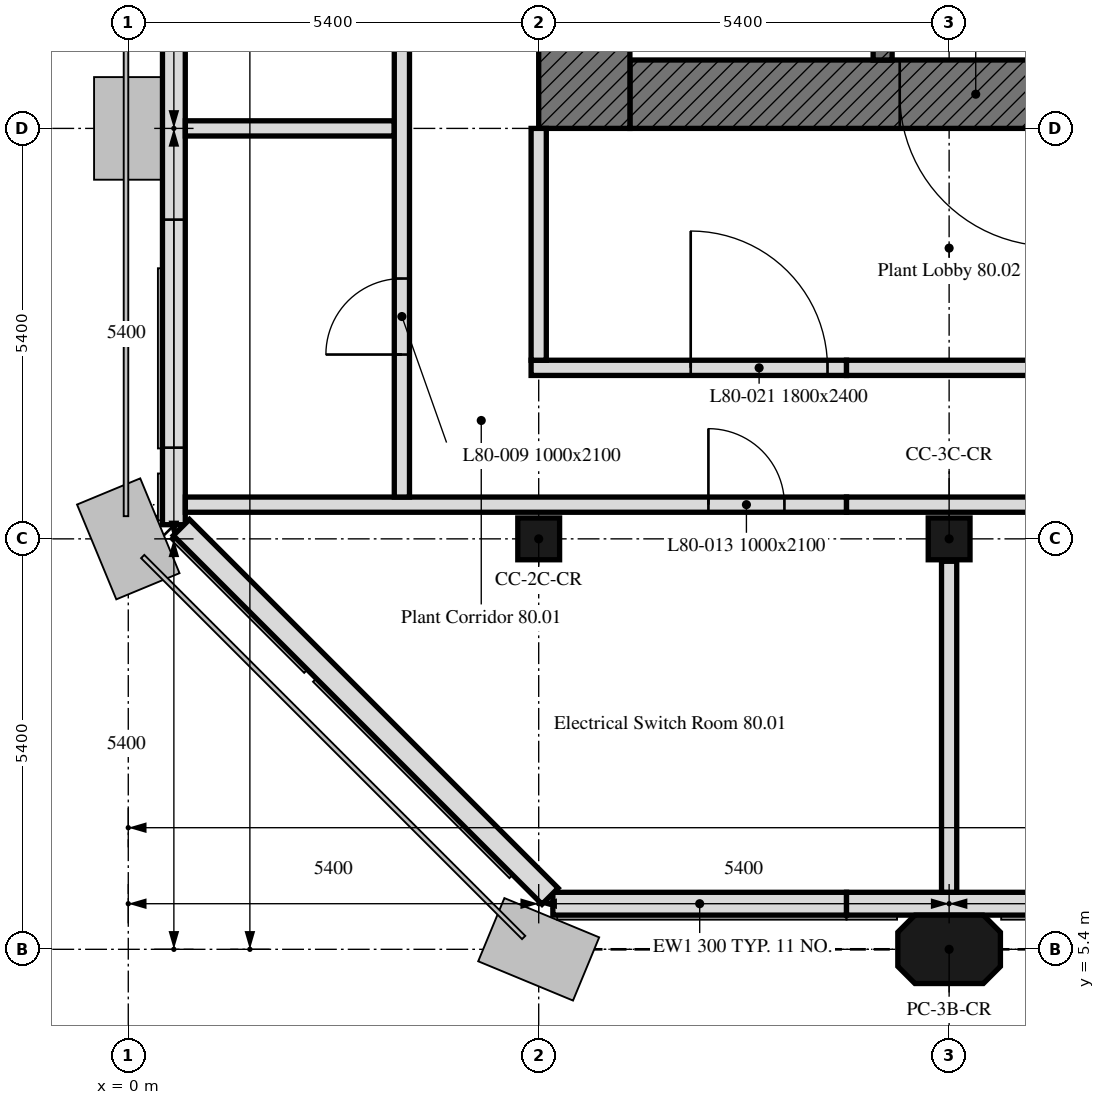
"""IFC4 building model, lengths in metres.
Left out: names, types, materials, properties, quantities, classifications, styles, units other than length and angle.
Written with IfcOpenShell. Run it as: python <this file> out.ifc"""

import sys

from ifc_helpers import new_model, si_unit, direction, frame, frame_2d, origin, origin_2d, place, context, subcontext, project, spatial, polyline, rectangle, outline, extrude, element, fill, save


model = new_model("IFC4")
c1 = context("Model", 3, precision=1e-05, world=origin(), true_north=direction((0.0, 1.0)))
c2 = subcontext(c1, "Body", "Model", "MODEL_VIEW")
j1 = project(units=[si_unit("LENGTHUNIT", "METRE"), si_unit("PLANEANGLEUNIT", "RADIAN")], contexts=[c1])
p1 = place(None, origin())
s1 = spatial("IfcSite", under=j1, at=p1, CompositionType="ELEMENT")
p2 = place(p1, origin())
s2 = spatial("IfcBuilding", under=s1, at=p2, CompositionType="ELEMENT")
p3 = place(p2, frame((0.0, 0.0, 321.7)))
s3 = spatial("IfcBuildingStorey", under=s2, at=p3, CompositionType="ELEMENT", Elevation=321.7)
p4 = place(p3, frame((10.8, 5.4, 0.0), z_axis=(0.0, 0.0, 1.0), x_axis=(1.0, 0.0, 0.0)))
e1 = element("IfcColumn", 1, at=p4, inside=s3, PredefinedType="COLUMN", context=c2, shape_type="SweptSolid", body=[
    extrude(outline(polyline([(-0.45, -0.45), (0.45, -0.45), (0.675, -0.225), (0.675, 0.225), (0.45, 0.45), (-0.45, 0.45), (-0.675, 0.225), (-0.675, -0.225), (-0.45, -0.45)])), origin(), (0.0, 0.0, 1.0), 4.2),
])
for number, where, z_axis, x_axis in (
    (2, (5.4, 10.8, 0.0), (0.0, 0.0, 1.0), (1.0, 0.0, 0.0)),
    (3, (10.8, 10.8, 0.0), (0.0, 0.0, 1.0), (1.0, 0.0, 0.0)),
):
    element("IfcColumn", number, at=place(p3, frame(where, z_axis=z_axis, x_axis=x_axis)), inside=s3, PredefinedType="COLUMN", context=c2, shape_type="SweptSolid", body=[
        extrude(rectangle(XDim=0.55, YDim=0.55, at=origin_2d()), origin(), (0.0, 0.0, 1.0), 4.2),
    ])
p5 = place(p3, frame((5.586, 6.0, 0.0), z_axis=(0.0, 0.0, 1.0), x_axis=(1.0, 0.0, 0.0)))
e4 = element("IfcWall", 4, at=p5, inside=s3, PredefinedType="SOLIDWALL", context=c2, shape_type="SweptSolid", body=[
    extrude(outline(polyline([(0.0, 0.0), (3.864, 0.0), (3.864, 4.2), (3.312, 6.955), (2.76, 6.709), (2.208, 6.464), (1.656, 6.219), (1.104, 5.973), (0.552, 5.728), (0.0, 5.483), (0.0, 0.0)])), frame((0.0, 0.15, 0.0), z_axis=(0.0, -1.0, 0.0), x_axis=(1.0, 0.0, 0.0)), (0.0, 0.0, 1.0), 0.3),
])
p6 = place(p3, frame((9.45, 6.0, 0.0), z_axis=(0.0, 0.0, 1.0), x_axis=(1.0, 0.0, 0.0)))
e5 = element("IfcWall", 5, at=p6, inside=s3, PredefinedType="SOLIDWALL", context=c2, shape_type="SweptSolid", body=[
    extrude(outline(polyline([(0.0, 0.0), (28.164, 0.0), (28.164, 4.2), (27.564, 4.2), (26.965, 4.2), (26.366, 4.2), (25.767, 4.2), (25.167, 4.2), (24.568, 4.2), (23.969, 4.2), (23.37, 4.2), (22.771, 4.2), (22.171, 4.2), (21.572, 4.2), (20.973, 4.2), (20.374, 4.2), (19.774, 4.2), (19.175, 4.2), (18.576, 4.2), (17.977, 4.2), (17.377, 4.2), (16.778, 4.2), (16.179, 4.2), (15.58, 4.2), (14.981, 4.2), (14.381, 4.2), (13.782, 4.2), (13.183, 4.2), (12.584, 4.2), (11.985, 4.2), (11.385, 4.2), (10.786, 4.2), (10.187, 4.2), (9.588, 4.2), (8.988, 4.2), (8.389, 4.2), (7.79, 4.2), (7.191, 4.2), (6.592, 4.2), (5.992, 4.2), (5.393, 4.2), (4.794, 4.2), (4.195, 4.2), (3.595, 4.2), (2.996, 4.2), (2.397, 4.2), (1.798, 4.2), (1.198, 4.2), (0.599, 4.2), (0.0, 4.2), (0.0, 0.0)])), frame((0.0, 0.15, 0.0), z_axis=(0.0, -1.0, 0.0), x_axis=(1.0, 0.0, 0.0)), (0.0, 0.0, 1.0), 0.3),
])
p7 = place(p6, frame((2.55, 0.0, 0.6)))
e6 = element("IfcOpeningElement", 6, at=p7, cuts=e5, PredefinedType="OPENING", context=c2, shape_type="SweptSolid", body=[
    extrude(rectangle(XDim=3.0, YDim=1.8, at=frame_2d((1.5, 0.9))), frame((0.0, 0.16, 0.0), z_axis=(0.0, -1.0, 0.0), x_axis=(1.0, 0.0, 0.0)), (0.0, 0.0, 1.0), 0.32),
])
p8 = place(p6, frame((7.95, 0.0, 0.6)))
e7 = element("IfcOpeningElement", 7, at=p8, cuts=e5, PredefinedType="OPENING", context=c2, shape_type="SweptSolid", body=[
    extrude(rectangle(XDim=3.0, YDim=1.8, at=frame_2d((1.5, 0.9))), frame((0.0, 0.16, 0.0), z_axis=(0.0, -1.0, 0.0), x_axis=(1.0, 0.0, 0.0)), (0.0, 0.0, 1.0), 0.32),
])
p9 = place(p6, frame((13.35, 0.0, 0.6)))
e8 = element("IfcOpeningElement", 8, at=p9, cuts=e5, PredefinedType="OPENING", context=c2, shape_type="SweptSolid", body=[
    extrude(rectangle(XDim=3.0, YDim=1.8, at=frame_2d((1.5, 0.9))), frame((0.0, 0.16, 0.0), z_axis=(0.0, -1.0, 0.0), x_axis=(1.0, 0.0, 0.0)), (0.0, 0.0, 1.0), 0.32),
])
p10 = place(p6, frame((18.75, 0.0, 0.6)))
e9 = element("IfcOpeningElement", 9, at=p10, cuts=e5, PredefinedType="OPENING", context=c2, shape_type="SweptSolid", body=[
    extrude(rectangle(XDim=3.0, YDim=1.8, at=frame_2d((1.5, 0.9))), frame((0.0, 0.16, 0.0), z_axis=(0.0, -1.0, 0.0), x_axis=(1.0, 0.0, 0.0)), (0.0, 0.0, 1.0), 0.32),
])
p11 = place(p6, frame((24.15, 0.0, 0.6)))
e10 = element("IfcOpeningElement", 10, at=p11, cuts=e5, PredefinedType="OPENING", context=c2, shape_type="SweptSolid", body=[
    extrude(rectangle(XDim=3.0, YDim=1.8, at=frame_2d((1.5, 0.9))), frame((0.0, 0.16, 0.0), z_axis=(0.0, -1.0, 0.0), x_axis=(1.0, 0.0, 0.0)), (0.0, 0.0, 1.0), 0.32),
])
p12 = place(p3, frame((0.6, 43.014, 0.0), z_axis=(0.0, 0.0, 1.0), x_axis=(0.0, -1.0, 0.0)))
e11 = element("IfcWall", 11, at=p12, inside=s3, PredefinedType="SOLIDWALL", context=c2, shape_type="SweptSolid", body=[
    extrude(outline(polyline([(0.0, 0.0), (32.027, 0.0), (32.027, 3.267), (31.434, 3.267), (30.841, 3.267), (30.248, 3.267), (29.655, 3.267), (29.062, 3.267), (28.469, 3.267), (27.875, 3.267), (27.282, 3.267), (26.689, 3.267), (26.096, 3.267), (25.503, 3.267), (24.91, 3.267), (24.317, 3.267), (23.724, 3.267), (23.131, 3.267), (22.538, 3.267), (21.945, 3.267), (21.352, 3.267), (20.758, 3.267), (20.165, 3.267), (19.572, 3.267), (18.979, 3.267), (18.386, 3.267), (17.793, 3.267), (17.2, 3.267), (16.607, 3.267), (16.014, 3.267), (15.42, 3.267), (14.827, 3.267), (14.234, 3.267), (13.641, 3.267), (13.048, 3.267), (12.455, 3.267), (11.862, 3.267), (11.269, 3.267), (10.676, 3.267), (10.083, 3.267), (9.49, 3.267), (8.896, 3.267), (8.303, 3.267), (7.71, 3.267), (7.117, 3.267), (6.524, 3.267), (5.931, 3.267), (5.338, 3.267), (4.745, 3.267), (4.152, 3.267), (3.559, 3.267), (2.966, 3.267), (2.372, 3.267), (1.779, 3.267), (1.186, 3.267), (0.593, 3.267), (0.0, 3.267), (0.0, 0.0)])), frame((0.0, 0.15, 0.0), z_axis=(0.0, -1.0, 0.0), x_axis=(1.0, 0.0, 0.0)), (0.0, 0.0, 1.0), 0.3),
])
p13 = place(p12, frame((1.81, 0.0, 0.6)))
e12 = element("IfcOpeningElement", 12, at=p13, cuts=e11, PredefinedType="OPENING", context=c2, shape_type="SweptSolid", body=[
    extrude(rectangle(XDim=3.0, YDim=1.8, at=frame_2d((1.5, 0.9))), frame((0.0, 0.16, 0.0), z_axis=(0.0, -1.0, 0.0), x_axis=(1.0, 0.0, 0.0)), (0.0, 0.0, 1.0), 0.32),
])
p14 = place(p12, frame((6.414, 0.0, 0.6)))
e13 = element("IfcOpeningElement", 13, at=p14, cuts=e11, PredefinedType="OPENING", context=c2, shape_type="SweptSolid", body=[
    extrude(rectangle(XDim=3.0, YDim=1.8, at=frame_2d((1.5, 0.9))), frame((0.0, 0.16, 0.0), z_axis=(0.0, -1.0, 0.0), x_axis=(1.0, 0.0, 0.0)), (0.0, 0.0, 1.0), 0.32),
])
p15 = place(p12, frame((11.814, 0.0, 0.6)))
e14 = element("IfcOpeningElement", 14, at=p15, cuts=e11, PredefinedType="OPENING", context=c2, shape_type="SweptSolid", body=[
    extrude(rectangle(XDim=3.0, YDim=1.8, at=frame_2d((1.5, 0.9))), frame((0.0, 0.16, 0.0), z_axis=(0.0, -1.0, 0.0), x_axis=(1.0, 0.0, 0.0)), (0.0, 0.0, 1.0), 0.32),
])
p16 = place(p12, frame((17.214, 0.0, 0.6)))
e15 = element("IfcOpeningElement", 15, at=p16, cuts=e11, PredefinedType="OPENING", context=c2, shape_type="SweptSolid", body=[
    extrude(rectangle(XDim=3.0, YDim=1.8, at=frame_2d((1.5, 0.9))), frame((0.0, 0.16, 0.0), z_axis=(0.0, -1.0, 0.0), x_axis=(1.0, 0.0, 0.0)), (0.0, 0.0, 1.0), 0.32),
])
p17 = place(p12, frame((22.614, 0.0, 0.6)))
e16 = element("IfcOpeningElement", 16, at=p17, cuts=e11, PredefinedType="OPENING", context=c2, shape_type="SweptSolid", body=[
    extrude(rectangle(XDim=3.0, YDim=1.8, at=frame_2d((1.5, 0.9))), frame((0.0, 0.16, 0.0), z_axis=(0.0, -1.0, 0.0), x_axis=(1.0, 0.0, 0.0)), (0.0, 0.0, 1.0), 0.32),
])
p18 = place(p12, frame((28.014, 0.0, 0.6)))
e17 = element("IfcOpeningElement", 17, at=p18, cuts=e11, PredefinedType="OPENING", context=c2, shape_type="SweptSolid", body=[
    extrude(rectangle(XDim=3.0, YDim=1.8, at=frame_2d((1.5, 0.9))), frame((0.0, 0.16, 0.0), z_axis=(0.0, -1.0, 0.0), x_axis=(1.0, 0.0, 0.0)), (0.0, 0.0, 1.0), 0.32),
])
p19 = place(p3, frame((0.699, 10.949, 0.0), z_axis=(0.0, 0.0, 1.0), x_axis=(0.707106781187, -0.707106781187, 0.0)))
e18 = element("IfcWall", 18, at=p19, inside=s3, PredefinedType="SOLIDWALL", context=c2, shape_type="SweptSolid", body=[
    extrude(outline(polyline([(0.0, 0.0), (6.86, 0.0), (6.86, 5.467), (6.288, 5.287), (5.716, 5.107), (5.145, 4.927), (4.573, 4.748), (4.001, 4.568), (3.43, 4.389), (2.858, 4.209), (2.287, 4.029), (1.715, 3.85), (1.143, 3.67), (0.572, 3.49), (0.0, 3.311), (0.0, 0.0)])), frame((0.0, 0.15, 0.0), z_axis=(0.0, -1.0, 0.0), x_axis=(1.0, 0.0, 0.0)), (0.0, 0.0, 1.0), 0.3),
])
p20 = place(p3, frame((17.7, 16.65, 0.0), z_axis=(0.0, 0.0, 1.0), x_axis=(-1.0, 0.0, 0.0)))
e19 = element("IfcWall", 19, at=p20, inside=s3, PredefinedType="SOLIDWALL", context=c2, shape_type="SweptSolid", body=[
    extrude(outline(polyline([(0.0, 0.0), (11.1, 0.0), (11.1, 5.933), (0.0, 4.2), (0.0, 0.0)])), frame((0.0, 0.45, 0.0), z_axis=(0.0, -1.0, 0.0), x_axis=(1.0, 0.0, 0.0)), (0.0, 0.0, 1.0), 0.9),
])
p21 = place(p20, frame((5.55, 0.0, 0.0)))
e20 = element("IfcOpeningElement", 20, at=p21, cuts=e19, PredefinedType="OPENING", context=c2, shape_type="SweptSolid", body=[
    extrude(rectangle(XDim=2.0, YDim=2.4, at=frame_2d((1.0, 1.2))), frame((0.0, 0.45, 0.0), z_axis=(0.0, -1.0, 0.0), x_axis=(1.0, 0.0, 0.0)), (0.0, 0.0, 1.0), 0.9),
])
p22 = place(p3, frame((6.0, 16.2, 0.0), z_axis=(0.0, 0.0, 1.0), x_axis=(0.0, 1.0, 0.0)))
e21 = element("IfcWall", 21, at=p22, inside=s3, PredefinedType="SOLIDWALL", context=c2, shape_type="SweptSolid", body=[
    extrude(rectangle(XDim=16.2, YDim=1.2, at=frame_2d((8.1, 0.0))), origin(), (0.0, 0.0, 1.0), 5.667),
])
p23 = place(p3, frame((9.925, 17.1, 0.0), z_axis=(0.0, 0.0, 1.0), x_axis=(0.0, 1.0, 0.0)))
e22 = element("IfcWall", 22, at=p23, inside=s3, PredefinedType="SOLIDWALL", context=c2, shape_type="SweptSolid", body=[
    extrude(rectangle(XDim=14.4, YDim=0.25, at=frame_2d((7.2, 0.0))), origin(), (0.0, 0.0, 1.0), 4.2),
])
p24 = place(p23, frame((4.6, 0.0, 0.0)))
e23 = element("IfcOpeningElement", 23, at=p24, cuts=e22, PredefinedType="OPENING", context=c2, shape_type="SweptSolid", body=[
    extrude(rectangle(XDim=1.0, YDim=2.1, at=frame_2d((0.5, 1.05))), frame((0.0, 0.125, 0.0), z_axis=(0.0, -1.0, 0.0), x_axis=(1.0, 0.0, 0.0)), (0.0, 0.0, 1.0), 0.25),
])
p25 = place(p23, frame((7.062, 0.0, 0.0)))
e24 = element("IfcOpeningElement", 24, at=p25, cuts=e22, PredefinedType="OPENING", context=c2, shape_type="SweptSolid", body=[
    extrude(rectangle(XDim=1.2, YDim=2.1, at=frame_2d((0.6, 1.05))), frame((0.0, 0.125, 0.0), z_axis=(0.0, -1.0, 0.0), x_axis=(1.0, 0.0, 0.0)), (0.0, 0.0, 1.0), 0.25),
])
p26 = place(p23, frame((10.106, 0.0, 0.0)))
e25 = element("IfcOpeningElement", 25, at=p26, cuts=e22, PredefinedType="OPENING", context=c2, shape_type="SweptSolid", body=[
    extrude(rectangle(XDim=0.9, YDim=2.1, at=frame_2d((0.45, 1.05))), frame((0.0, 0.125, 0.0), z_axis=(0.0, -1.0, 0.0), x_axis=(1.0, 0.0, 0.0)), (0.0, 0.0, 1.0), 0.25),
])
p27 = place(p23, frame((12.719, 0.0, 0.0)))
e26 = element("IfcOpeningElement", 26, at=p27, cuts=e22, PredefinedType="OPENING", context=c2, shape_type="SweptSolid", body=[
    extrude(rectangle(XDim=0.9, YDim=2.1, at=frame_2d((0.45, 1.05))), frame((0.0, 0.125, 0.0), z_axis=(0.0, -1.0, 0.0), x_axis=(1.0, 0.0, 0.0)), (0.0, 0.0, 1.0), 0.25),
])
p28 = place(p3, frame((3.5, 16.2, 0.0), z_axis=(0.0, 0.0, 1.0), x_axis=(-1.0, 0.0, 0.0)))
e27 = element("IfcWall", 27, at=p28, inside=s3, PredefinedType="PARTITIONING", context=c2, shape_type="SweptSolid", body=[
    extrude(outline(polyline([(0.0, 0.0), (2.749, 0.0), (2.749, 3.334), (0.0, 4.556), (0.0, 0.0)])), frame((0.0, 0.1, 0.0), z_axis=(0.0, -1.0, 0.0), x_axis=(1.0, 0.0, 0.0)), (0.0, 0.0, 1.0), 0.2),
])
p29 = place(p3, frame((10.8, 10.505, 0.0), z_axis=(0.0, 0.0, 1.0), x_axis=(0.0, -1.0, 0.0)))
e28 = element("IfcWall", 28, at=p29, inside=s3, PredefinedType="PARTITIONING", context=c2, shape_type="SweptSolid", body=[
    extrude(rectangle(XDim=4.354, YDim=0.2, at=frame_2d((2.177, 0.0))), origin(), (0.0, 0.0, 1.0), 4.2),
])
p30 = place(p3, frame((0.751, 11.25, 0.0), z_axis=(0.0, 0.0, 1.0), x_axis=(1.0, 0.0, 0.0)))
e29 = element("IfcWall", 29, at=p30, inside=s3, PredefinedType="PARTITIONING", context=c2, shape_type="SweptSolid", body=[
    extrude(outline(polyline([(0.0, 0.0), (8.699, 0.0), (8.699, 4.2), (0.0, 3.334), (0.0, 0.0)])), frame((0.0, 0.1, 0.0), z_axis=(0.0, -1.0, 0.0), x_axis=(1.0, 0.0, 0.0)), (0.0, 0.0, 1.0), 0.2),
])
p31 = place(p30, frame((6.882, 0.0, 0.0)))
e30 = element("IfcOpeningElement", 30, at=p31, cuts=e29, PredefinedType="OPENING", context=c2, shape_type="SweptSolid", body=[
    extrude(rectangle(XDim=1.0, YDim=2.1, at=frame_2d((0.5, 1.05))), frame((0.0, 0.1, 0.0), z_axis=(0.0, -1.0, 0.0), x_axis=(1.0, 0.0, 0.0)), (0.0, 0.0, 1.0), 0.2),
])
p32 = place(p3, frame((9.45, 11.25, 0.0), z_axis=(0.0, 0.0, 1.0), x_axis=(1.0, 0.0, 0.0)))
e31 = element("IfcWall", 31, at=p32, inside=s3, PredefinedType="PARTITIONING", context=c2, shape_type="SweptSolid", body=[
    extrude(rectangle(XDim=32.999, YDim=0.2, at=frame_2d((16.5, 0.0))), origin(), (0.0, 0.0, 1.0), 4.2),
])
p33 = place(p32, frame((25.167, 0.0, 0.0)))
e32 = element("IfcOpeningElement", 32, at=p33, cuts=e31, PredefinedType="OPENING", context=c2, shape_type="SweptSolid", body=[
    extrude(rectangle(XDim=1.0, YDim=2.1, at=frame_2d((0.5, 1.05))), frame((0.0, 0.1, 0.0), z_axis=(0.0, -1.0, 0.0), x_axis=(1.0, 0.0, 0.0)), (0.0, 0.0, 1.0), 0.2),
])
p34 = place(p32, frame((19.733, 0.0, 0.0)))
e33 = element("IfcOpeningElement", 33, at=p34, cuts=e31, PredefinedType="OPENING", context=c2, shape_type="SweptSolid", body=[
    extrude(rectangle(XDim=1.0, YDim=2.1, at=frame_2d((0.5, 1.05))), frame((0.0, 0.1, 0.0), z_axis=(0.0, -1.0, 0.0), x_axis=(1.0, 0.0, 0.0)), (0.0, 0.0, 1.0), 0.2),
])
p35 = place(p32, frame((3.567, 0.0, 0.0)))
e34 = element("IfcOpeningElement", 34, at=p35, cuts=e31, PredefinedType="OPENING", context=c2, shape_type="SweptSolid", body=[
    extrude(rectangle(XDim=1.0, YDim=2.1, at=frame_2d((0.5, 1.05))), frame((0.0, 0.1, 0.0), z_axis=(0.0, -1.0, 0.0), x_axis=(1.0, 0.0, 0.0)), (0.0, 0.0, 1.0), 0.2),
])
p36 = place(p3, frame((3.6, 11.35, 0.0), z_axis=(0.0, 0.0, 1.0), x_axis=(0.0, 1.0, 0.0)))
e35 = element("IfcWall", 35, at=p36, inside=s3, PredefinedType="PARTITIONING", context=c2, shape_type="SweptSolid", body=[
    extrude(rectangle(XDim=29.95, YDim=0.2, at=frame_2d((14.975, 0.0))), origin(), (0.0, 0.0, 1.0), 4.6),
])
p37 = place(p36, frame((23.508, 0.0, 0.0)))
e36 = element("IfcOpeningElement", 36, at=p37, cuts=e35, PredefinedType="OPENING", context=c2, shape_type="SweptSolid", body=[
    extrude(rectangle(XDim=1.0, YDim=2.1, at=frame_2d((0.5, 1.05))), frame((0.0, 0.1, 0.0), z_axis=(0.0, -1.0, 0.0), x_axis=(1.0, 0.0, 0.0)), (0.0, 0.0, 1.0), 0.2),
])
p38 = place(p36, frame((17.85, 0.0, 0.0)))
e37 = element("IfcOpeningElement", 37, at=p38, cuts=e35, PredefinedType="OPENING", context=c2, shape_type="SweptSolid", body=[
    extrude(rectangle(XDim=1.0, YDim=2.1, at=frame_2d((0.5, 1.05))), frame((0.0, 0.1, 0.0), z_axis=(0.0, -1.0, 0.0), x_axis=(1.0, 0.0, 0.0)), (0.0, 0.0, 1.0), 0.2),
])
p39 = place(p36, frame((1.875, 0.0, 0.0)))
e38 = element("IfcOpeningElement", 38, at=p39, cuts=e35, PredefinedType="OPENING", context=c2, shape_type="SweptSolid", body=[
    extrude(rectangle(XDim=1.0, YDim=2.1, at=frame_2d((0.5, 1.05))), frame((0.0, 0.1, 0.0), z_axis=(0.0, -1.0, 0.0), x_axis=(1.0, 0.0, 0.0)), (0.0, 0.0, 1.0), 0.2),
])
p40 = place(p36, frame((9.75, 0.0, 0.0)))
e39 = element("IfcOpeningElement", 39, at=p40, cuts=e35, PredefinedType="OPENING", context=c2, shape_type="SweptSolid", body=[
    extrude(rectangle(XDim=1.0, YDim=2.1, at=frame_2d((0.5, 1.05))), frame((0.0, 0.1, 0.0), z_axis=(0.0, -1.0, 0.0), x_axis=(1.0, 0.0, 0.0)), (0.0, 0.0, 1.0), 0.2),
])
p41 = place(p3, frame((5.3, 13.05, 0.0), z_axis=(0.0, 0.0, 1.0), x_axis=(1.0, 0.0, 0.0)))
e40 = element("IfcWall", 40, at=p41, inside=s3, PredefinedType="PARTITIONING", context=c2, shape_type="SweptSolid", body=[
    extrude(outline(polyline([(0.0, 0.0), (4.15, 0.0), (4.15, 4.2), (0.0, 5.356), (0.0, 0.0)])), frame((0.0, 0.1, 0.0), z_axis=(0.0, -1.0, 0.0), x_axis=(1.0, 0.0, 0.0)), (0.0, 0.0, 1.0), 0.2),
])
p42 = place(p41, frame((2.1, 0.0, 0.0)))
e41 = element("IfcOpeningElement", 41, at=p42, cuts=e40, PredefinedType="OPENING", context=c2, shape_type="SweptSolid", body=[
    extrude(rectangle(XDim=1.8, YDim=2.4, at=frame_2d((0.9, 1.2))), frame((0.0, 0.1, 0.0), z_axis=(0.0, -1.0, 0.0), x_axis=(1.0, 0.0, 0.0)), (0.0, 0.0, 1.0), 0.2),
])
p43 = place(p3, frame((9.45, 13.05, 0.0), z_axis=(0.0, 0.0, 1.0), x_axis=(1.0, 0.0, 0.0)))
e42 = element("IfcWall", 42, at=p43, inside=s3, PredefinedType="PARTITIONING", context=c2, shape_type="SweptSolid", body=[
    extrude(rectangle(XDim=31.899, YDim=0.2, at=frame_2d((15.95, 0.0))), origin(), (0.0, 0.0, 1.0), 4.2),
])
p44 = place(p43, frame((19.75, 0.0, 0.0)))
e43 = element("IfcOpeningElement", 43, at=p44, cuts=e42, PredefinedType="OPENING", context=c2, shape_type="SweptSolid", body=[
    extrude(rectangle(XDim=1.0, YDim=2.1, at=frame_2d((0.5, 1.05))), frame((0.0, 0.1, 0.0), z_axis=(0.0, -1.0, 0.0), x_axis=(1.0, 0.0, 0.0)), (0.0, 0.0, 1.0), 0.2),
])
p45 = place(p43, frame((14.35, 0.0, 0.0)))
e44 = element("IfcOpeningElement", 44, at=p45, cuts=e42, PredefinedType="OPENING", context=c2, shape_type="SweptSolid", body=[
    extrude(rectangle(XDim=1.0, YDim=2.1, at=frame_2d((0.5, 1.05))), frame((0.0, 0.1, 0.0), z_axis=(0.0, -1.0, 0.0), x_axis=(1.0, 0.0, 0.0)), (0.0, 0.0, 1.0), 0.2),
])
p46 = place(p43, frame((9.05, 0.0, 0.0)))
e45 = element("IfcOpeningElement", 45, at=p46, cuts=e42, PredefinedType="OPENING", context=c2, shape_type="SweptSolid", body=[
    extrude(rectangle(XDim=0.8, YDim=2.1, at=frame_2d((0.4, 1.05))), frame((0.0, 0.1, 0.0), z_axis=(0.0, -1.0, 0.0), x_axis=(1.0, 0.0, 0.0)), (0.0, 0.0, 1.0), 0.2),
])
p47 = place(p43, frame((25.35, 0.0, 0.0)))
e46 = element("IfcOpeningElement", 46, at=p47, cuts=e42, PredefinedType="OPENING", context=c2, shape_type="SweptSolid", body=[
    extrude(rectangle(XDim=1.8, YDim=2.4, at=frame_2d((0.9, 1.2))), frame((0.0, 0.1, 0.0), z_axis=(0.0, -1.0, 0.0), x_axis=(1.0, 0.0, 0.0)), (0.0, 0.0, 1.0), 0.2),
])
p48 = place(p3, frame((5.4, 16.2, 0.0), z_axis=(0.0, 0.0, 1.0), x_axis=(0.0, -1.0, 0.0)))
e47 = element("IfcWall", 47, at=p48, inside=s3, PredefinedType="PARTITIONING", context=c2, shape_type="SweptSolid", body=[
    extrude(rectangle(XDim=3.05, YDim=0.2, at=frame_2d((1.525, 0.0))), origin(), (0.0, 0.0, 1.0), 5.4),
])
p49 = place(p18, origin())
e48 = element("IfcWindow", 48, at=p49, inside=s3, PartitioningType="SINGLE_PANEL", PredefinedType="WINDOW", context=c2, shape_type="SweptSolid", body=[
    extrude(rectangle(XDim=3.0, YDim=1.8, at=frame_2d((1.5, 0.9))), frame((0.0, 0.03, 0.0), z_axis=(0.0, -1.0, 0.0), x_axis=(1.0, 0.0, 0.0)), (0.0, 0.0, 1.0), 0.06),
])
fill(e17, e48)
p50 = place(p21, origin())
e49 = element("IfcDoor", 49, at=p50, inside=s3, OperationType="DOUBLE_DOOR_SINGLE_SWING", PredefinedType="DOOR", context=c2, shape_type="SweptSolid", body=[
    extrude(rectangle(XDim=2.0, YDim=2.4, at=frame_2d((1.0, 1.2))), frame((0.0, 0.025, 0.0), z_axis=(0.0, -1.0, 0.0), x_axis=(1.0, 0.0, 0.0)), (0.0, 0.0, 1.0), 0.05),
])
fill(e20, e49)
p51 = place(p39, origin())
e50 = element("IfcDoor", 50, at=p51, inside=s3, OperationType="SINGLE_SWING_RIGHT", PredefinedType="DOOR", context=c2, shape_type="SweptSolid", body=[
    extrude(rectangle(XDim=1.0, YDim=2.1, at=frame_2d((0.5, 1.05))), frame((0.0, 0.025, 0.0), z_axis=(0.0, -1.0, 0.0), x_axis=(1.0, 0.0, 0.0)), (0.0, 0.0, 1.0), 0.05),
])
fill(e38, e50)
p52 = place(p31, origin())
e51 = element("IfcDoor", 51, at=p52, inside=s3, OperationType="SINGLE_SWING_RIGHT", PredefinedType="DOOR", context=c2, shape_type="SweptSolid", body=[
    extrude(rectangle(XDim=1.0, YDim=2.1, at=frame_2d((0.5, 1.05))), frame((0.0, 0.025, 0.0), z_axis=(0.0, -1.0, 0.0), x_axis=(1.0, 0.0, 0.0)), (0.0, 0.0, 1.0), 0.05),
])
fill(e30, e51)
p53 = place(p42, origin())
e52 = element("IfcDoor", 52, at=p53, inside=s3, OperationType="DOUBLE_DOOR_SINGLE_SWING", PredefinedType="DOOR", context=c2, shape_type="SweptSolid", body=[
    extrude(rectangle(XDim=1.8, YDim=2.4, at=frame_2d((0.9, 1.2))), frame((0.0, 0.025, 0.0), z_axis=(0.0, -1.0, 0.0), x_axis=(1.0, 0.0, 0.0)), (0.0, 0.0, 1.0), 0.05),
])
fill(e41, e52)
save(model, sys.argv[1])
